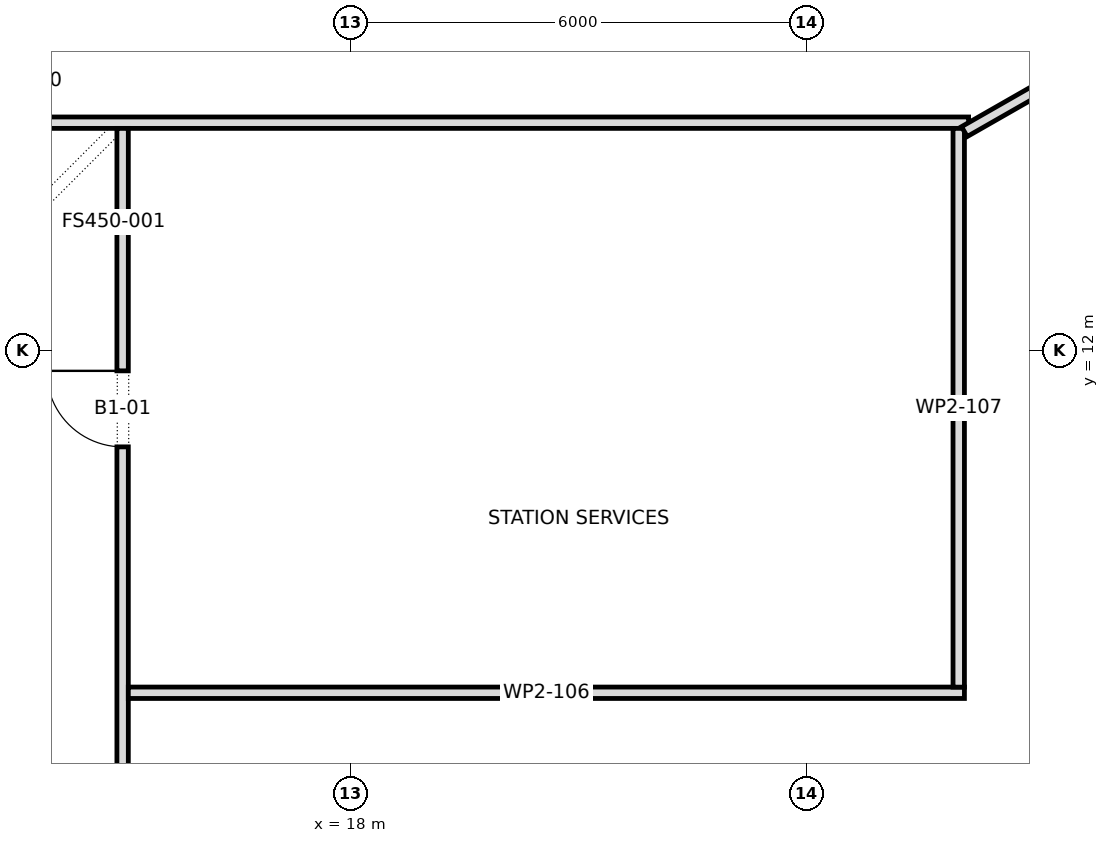
"""IFC4 building model, lengths in metres.
Left out: names, types, materials, properties, quantities, classifications, styles, units other than length and angle.
Written with IfcOpenShell. Run it as: python <this file> out.ifc"""

import sys

from ifc_helpers import new_model, si_unit, direction, frame, frame_2d, origin, place, context, subcontext, project, spatial, polyline, rectangle, outline, extrude, element, fill, save


model = new_model("IFC4")
c1 = context("Model", 3, precision=1e-05, world=origin(), true_north=direction((0.0, 1.0)))
c2 = subcontext(c1, "Body", "Model", "MODEL_VIEW")
j1 = project(units=[si_unit("LENGTHUNIT", "METRE"), si_unit("PLANEANGLEUNIT", "RADIAN")], contexts=[c1])
p1 = place(None, origin())
s1 = spatial("IfcSite", under=j1, at=p1, CompositionType="ELEMENT")
p2 = place(p1, origin())
s2 = spatial("IfcBuilding", under=s1, at=p2, CompositionType="ELEMENT")
p3 = place(p2, frame((0.0, 0.0, -4.0)))
s3 = spatial("IfcBuildingStorey", under=s2, at=p3, CompositionType="ELEMENT", Elevation=-4.0)
p4 = place(p3, frame((1.125, 15.0, 0.0), z_axis=(0.0, 0.0, 1.0), x_axis=(1.0, 0.0, 0.0)))
e1 = element("IfcWall", 1, at=p4, inside=s3, PredefinedType="PARTITIONING", context=c2, shape_type="SweptSolid", body=[
    extrude(rectangle(XDim=25.005, YDim=0.15, at=frame_2d((12.502, 0.0))), origin(), (0.0, 0.0, 1.0), 3.55),
])
p5 = place(p4, frame((11.725, 0.0, 0.0)))
e2 = element("IfcOpeningElement", 2, at=p5, cuts=e1, PredefinedType="OPENING", context=c2, shape_type="SweptSolid", body=[
    extrude(rectangle(XDim=1.0, YDim=2.1, at=frame_2d((0.5, 1.05))), frame((0.0, 0.087, 0.0), z_axis=(0.0, -1.0, 0.0), x_axis=(1.0, 0.0, 0.0)), (0.0, 0.0, 1.0), 0.174),
])
p6 = place(p4, frame((4.444, 0.0, 0.0)))
e3 = element("IfcOpeningElement", 3, at=p6, cuts=e1, PredefinedType="OPENING", context=c2, shape_type="SweptSolid", body=[
    extrude(rectangle(XDim=1.8, YDim=2.1, at=frame_2d((0.9, 1.05))), frame((0.0, 0.087, 0.0), z_axis=(0.0, -1.0, 0.0), x_axis=(1.0, 0.0, 0.0)), (0.0, 0.0, 1.0), 0.174),
])
p7 = place(p3, frame((11.788, 15.074, 0.0), z_axis=(0.0, 0.0, 1.0), x_axis=(0.615848120598, 0.787864894735, 0.0)))
e4 = element("IfcWall", 4, at=p7, inside=s3, PredefinedType="PARTITIONING", context=c2, shape_type="SweptSolid", body=[
    extrude(outline(polyline([(0.0, -0.075), (14.449, -0.075), (14.428, 0.075), (0.0, 0.075), (0.0, -0.075)])), origin(), (0.0, 0.0, 1.0), 3.55),
])
p8 = place(p3, frame((15.0, -14.925, 0.0), z_axis=(0.0, 0.0, 1.0), x_axis=(0.0, 1.0, 0.0)))
e5 = element("IfcWall", 5, at=p8, inside=s3, PredefinedType="PARTITIONING", context=c2, shape_type="SweptSolid", body=[
    extrude(rectangle(XDim=29.85, YDim=0.15, at=frame_2d((14.925, 0.0))), origin(), (0.0, 0.0, 1.0), 3.55),
])
p9 = place(p8, frame((25.66, 0.0, 0.0)))
e6 = element("IfcOpeningElement", 6, at=p9, cuts=e5, PredefinedType="OPENING", context=c2, shape_type="SweptSolid", body=[
    extrude(rectangle(XDim=1.0, YDim=2.1, at=frame_2d((0.5, 1.05))), frame((0.0, 0.087, 0.0), z_axis=(0.0, -1.0, 0.0), x_axis=(1.0, 0.0, 0.0)), (0.0, 0.0, 1.0), 0.174),
])
p10 = place(p8, frame((3.19, 0.0, 0.0)))
e7 = element("IfcOpeningElement", 7, at=p10, cuts=e5, PredefinedType="OPENING", context=c2, shape_type="SweptSolid", body=[
    extrude(rectangle(XDim=1.0, YDim=2.1, at=frame_2d((0.5, 1.05))), frame((0.0, 0.087, 0.0), z_axis=(0.0, -1.0, 0.0), x_axis=(1.0, 0.0, 0.0)), (0.0, 0.0, 1.0), 0.174),
])
p11 = place(p8, frame((13.725, 0.0, 0.0)))
e8 = element("IfcOpeningElement", 8, at=p11, cuts=e5, PredefinedType="OPENING", context=c2, shape_type="SweptSolid", body=[
    extrude(rectangle(XDim=2.4, YDim=2.1, at=frame_2d((1.2, 1.05))), frame((0.0, 0.087, 0.0), z_axis=(0.0, -1.0, 0.0), x_axis=(1.0, 0.0, 0.0)), (0.0, 0.0, 1.0), 0.174),
])
p12 = place(p3, frame((26.075, 7.5, 0.0), z_axis=(0.0, 0.0, 1.0), x_axis=(-1.0, 0.0, 0.0)))
e9 = element("IfcWall", 9, at=p12, inside=s3, PredefinedType="PARTITIONING", context=c2, shape_type="SweptSolid", body=[
    extrude(rectangle(XDim=11.0, YDim=0.15, at=frame_2d((5.5, 0.0))), origin(), (0.0, 0.0, 1.0), 3.55),
])
p13 = place(p3, frame((26.0, 7.574, 0.0), z_axis=(0.0, 0.0, 1.0), x_axis=(0.0, 1.0, 0.0)))
e10 = element("IfcWall", 10, at=p13, inside=s3, PredefinedType="PARTITIONING", context=c2, shape_type="SweptSolid", body=[
    extrude(rectangle(XDim=7.351, YDim=0.15, at=frame_2d((3.676, 0.0))), origin(), (0.0, 0.0, 1.0), 3.55),
])
p14 = place(p3, frame((26.074, 14.882, 0.0), z_axis=(0.0, 0.0, 1.0), x_axis=(0.868133416031, 0.496330909746, 0.0)))
e11 = element("IfcWall", 11, at=p14, inside=s3, PredefinedType="PARTITIONING", context=c2, shape_type="SweptSolid", body=[
    extrude(outline(polyline([(0.0, -0.075), (5.626, -0.075), (5.604, 0.075), (0.0, 0.075), (0.0, -0.075)])), origin(), (0.0, 0.0, 1.0), 3.55),
])
p15 = place(p9, origin())
e12 = element("IfcDoor", 12, at=p15, inside=s3, OperationType="SINGLE_SWING_LEFT", PredefinedType="DOOR", context=c2, shape_type="SweptSolid", body=[
    extrude(rectangle(XDim=1.0, YDim=2.1, at=frame_2d((0.5, 1.05))), frame((0.0, 0.025, 0.0), z_axis=(0.0, -1.0, 0.0), x_axis=(1.0, 0.0, 0.0)), (0.0, 0.0, 1.0), 0.05),
])
fill(e6, e12)
save(model, sys.argv[1])
